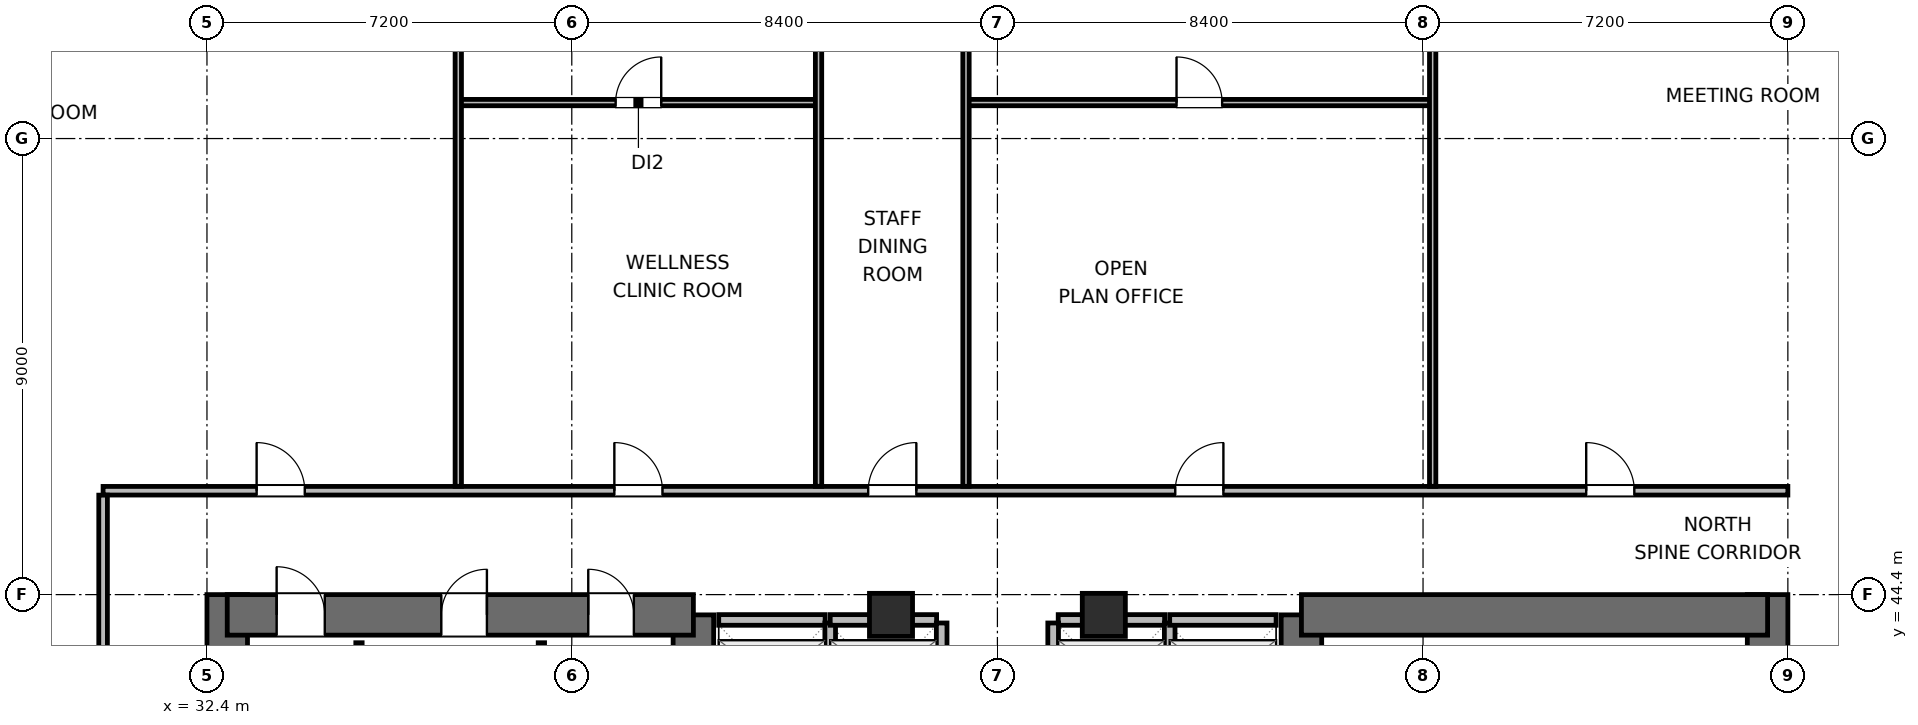
"""IFC4 building model, lengths in metres.
Left out: names, types, materials, properties, quantities, classifications, styles, units other than length and angle.
Written with IfcOpenShell. Run it as: python <this file> out.ifc"""

import sys

from ifc_helpers import new_model, si_unit, direction, frame, frame_2d, origin, origin_2d, place, context, subcontext, project, spatial, rectangle, extrude, element, fill, save


model = new_model("IFC4")
c1 = context("Model", 3, precision=1e-05, world=origin(), true_north=direction((0.0, 1.0)))
c2 = subcontext(c1, "Body", "Model", "MODEL_VIEW")
j1 = project(units=[si_unit("LENGTHUNIT", "METRE"), si_unit("PLANEANGLEUNIT", "RADIAN")], contexts=[c1])
p1 = place(None, origin())
s1 = spatial("IfcSite", under=j1, at=p1, CompositionType="ELEMENT")
p2 = place(p1, origin())
s2 = spatial("IfcBuilding", under=s1, at=p2, CompositionType="ELEMENT")
p3 = place(p2, frame((0.0, 0.0, 141.6)))
s3 = spatial("IfcBuildingStorey", under=s2, at=p3, CompositionType="ELEMENT", Elevation=141.6)
p4 = place(p3, frame((32.8, 27.6, 0.0), z_axis=(0.0, 0.0, 1.0), x_axis=(0.0, 1.0, 0.0)))
e1 = element("IfcWall", 1, at=p4, inside=s3, PredefinedType="SHEAR", context=c2, shape_type="SweptSolid", body=[
    extrude(rectangle(XDim=16.8, YDim=0.8, at=frame_2d((8.4, 0.0))), origin(), (0.0, 0.0, 1.0), 3.9),
])
p5 = place(p3, frame((42.0, 37.8, 0.0), z_axis=(0.0, 0.0, 1.0), x_axis=(0.0, 1.0, 0.0)))
e2 = element("IfcWall", 2, at=p5, inside=s3, PredefinedType="SHEAR", context=c2, shape_type="SweptSolid", body=[
    extrude(rectangle(XDim=6.2, YDim=0.8, at=frame_2d((3.1, 0.0))), origin(), (0.0, 0.0, 1.0), 3.9),
])
p6 = place(p3, frame((32.8, 44.0, 0.0), z_axis=(0.0, 0.0, 1.0), x_axis=(1.0, 0.0, 0.0)))
e3 = element("IfcWall", 3, at=p6, inside=s3, PredefinedType="SHEAR", context=c2, shape_type="SweptSolid", body=[
    extrude(rectangle(XDim=9.2, YDim=0.8, at=frame_2d((4.6, 0.0))), origin(), (0.0, 0.0, 1.0), 3.9),
])
p7 = place(p6, frame((0.975, 0.0, 0.0)))
e4 = element("IfcOpeningElement", 4, at=p7, cuts=e3, PredefinedType="OPENING", context=c2, shape_type="SweptSolid", body=[
    extrude(rectangle(XDim=0.95, YDim=2.04, at=frame_2d((0.475, 1.02))), frame((0.0, 0.41, 0.0), z_axis=(0.0, -1.0, 0.0), x_axis=(1.0, 0.0, 0.0)), (0.0, 0.0, 1.0), 0.82),
])
p8 = place(p6, frame((4.225, 0.0, 0.0)))
e5 = element("IfcOpeningElement", 5, at=p8, cuts=e3, PredefinedType="OPENING", context=c2, shape_type="SweptSolid", body=[
    extrude(rectangle(XDim=0.9, YDim=2.02, at=frame_2d((0.45, 1.01))), frame((0.0, 0.41, 0.0), z_axis=(0.0, -1.0, 0.0), x_axis=(1.0, 0.0, 0.0)), (0.0, 0.0, 1.0), 0.82),
])
p9 = place(p6, frame((7.125, 0.0, 0.0)))
e6 = element("IfcOpeningElement", 6, at=p9, cuts=e3, PredefinedType="OPENING", context=c2, shape_type="SweptSolid", body=[
    extrude(rectangle(XDim=0.9, YDim=2.02, at=frame_2d((0.45, 1.01))), frame((0.0, 0.41, 0.0), z_axis=(0.0, -1.0, 0.0), x_axis=(1.0, 0.0, 0.0)), (0.0, 0.0, 1.0), 0.82),
])
p10 = place(p3, frame((54.0, 38.0, 0.0), z_axis=(0.0, 0.0, 1.0), x_axis=(0.0, 1.0, 0.0)))
e7 = element("IfcWall", 7, at=p10, inside=s3, PredefinedType="SHEAR", context=c2, shape_type="SweptSolid", body=[
    extrude(rectangle(XDim=6.0, YDim=0.8, at=frame_2d((3.0, 0.0))), origin(), (0.0, 0.0, 1.0), 3.9),
])
p11 = place(p3, frame((63.2, 27.6, 0.0), z_axis=(0.0, 0.0, 1.0), x_axis=(0.0, 1.0, 0.0)))
e8 = element("IfcWall", 8, at=p11, inside=s3, PredefinedType="SHEAR", context=c2, shape_type="SweptSolid", body=[
    extrude(rectangle(XDim=16.8, YDim=0.8, at=frame_2d((8.4, 0.0))), origin(), (0.0, 0.0, 1.0), 3.9),
])
p12 = place(p3, frame((54.0, 44.0, 0.0), z_axis=(0.0, 0.0, 1.0), x_axis=(1.0, 0.0, 0.0)))
e9 = element("IfcWall", 9, at=p12, inside=s3, PredefinedType="SHEAR", context=c2, shape_type="SweptSolid", body=[
    extrude(rectangle(XDim=9.2, YDim=0.8, at=frame_2d((4.6, 0.0))), origin(), (0.0, 0.0, 1.0), 3.9),
])
for number, where, z_axis, x_axis in (
    (10, (45.9, 44.0, 0.0), (0.0, 0.0, 1.0), (1.0, 0.0, 0.0)),
    (11, (50.1, 44.0, 0.0), (0.0, 0.0, 1.0), (1.0, 0.0, 0.0)),
):
    element("IfcColumn", number, at=place(p3, frame(where, z_axis=z_axis, x_axis=x_axis)), inside=s3, PredefinedType="COLUMN", context=c2, shape_type="SweptSolid", body=[
        extrude(rectangle(XDim=0.85, YDim=0.85, at=origin_2d()), origin(), (0.0, 0.0, 1.0), 3.9),
    ])
for number, where, z_axis, x_axis in (
    (12, (35.4, 41.095, 0.0), (0.0, 0.0, 1.0), (0.0, 1.0, 0.0)),
    (13, (39.0, 41.095, 0.0), (0.0, 0.0, 1.0), (0.0, 1.0, 0.0)),
):
    element("IfcWall", number, at=place(p3, frame(where, z_axis=z_axis, x_axis=x_axis)), inside=s3, PredefinedType="PARTITIONING", context=c2, shape_type="SweptSolid", body=[
        extrude(rectangle(XDim=2.355, YDim=0.125, at=frame_2d((1.177, 0.0))), origin(), (0.0, 0.0, 1.0), 3.6),
    ])
p13 = place(p3, frame((42.5, 43.9, 0.0), z_axis=(0.0, 0.0, 1.0), x_axis=(1.0, 0.0, 0.0)))
e14 = element("IfcWall", 14, at=p13, inside=s3, PredefinedType="PARTITIONING", context=c2, shape_type="SweptSolid", body=[
    extrude(rectangle(XDim=2.1, YDim=0.21, at=frame_2d((1.05, 0.0))), origin(), (0.0, 0.0, 1.0), 2.485),
])
p14 = place(p3, frame((44.7, 41.56, 0.0), z_axis=(0.0, 0.0, 1.0), x_axis=(0.0, 1.0, 0.0)))
e15 = element("IfcWall", 15, at=p14, inside=s3, PredefinedType="PARTITIONING", context=c2, shape_type="SweptSolid", body=[
    extrude(rectangle(XDim=2.28, YDim=0.21, at=frame_2d((1.14, 0.0))), origin(), (0.0, 0.0, 1.0), 3.6),
])
p15 = place(p3, frame((44.7, 43.9, 0.0), z_axis=(0.0, 0.0, 1.0), x_axis=(1.0, 0.0, 0.0)))
e16 = element("IfcWall", 16, at=p15, inside=s3, PredefinedType="PARTITIONING", context=c2, shape_type="SweptSolid", body=[
    extrude(rectangle(XDim=2.1, YDim=0.21, at=frame_2d((1.05, 0.0))), origin(), (0.0, 0.0, 1.0), 2.485),
])
p16 = place(p3, frame((46.9, 41.56, 0.0), z_axis=(0.0, 0.0, 1.0), x_axis=(0.0, 1.0, 0.0)))
e17 = element("IfcWall", 17, at=p16, inside=s3, PredefinedType="PARTITIONING", context=c2, shape_type="SweptSolid", body=[
    extrude(rectangle(XDim=2.28, YDim=0.21, at=frame_2d((1.14, 0.0))), origin(), (0.0, 0.0, 1.0), 3.6),
])
p17 = place(p3, frame((49.2, 43.9, 0.0), z_axis=(0.0, 0.0, 1.0), x_axis=(1.0, 0.0, 0.0)))
e18 = element("IfcWall", 18, at=p17, inside=s3, PredefinedType="PARTITIONING", context=c2, shape_type="SweptSolid", body=[
    extrude(rectangle(XDim=2.1, YDim=0.21, at=frame_2d((1.05, 0.0))), origin(), (0.0, 0.0, 1.0), 2.485),
])
for number, where, z_axis, x_axis in (
    (19, (49.1, 41.56, 0.0), (0.0, 0.0, 1.0), (0.0, 1.0, 0.0)),
    (20, (51.4, 41.56, 0.0), (0.0, 0.0, 1.0), (0.0, 1.0, 0.0)),
):
    element("IfcWall", number, at=place(p3, frame(where, z_axis=z_axis, x_axis=x_axis)), inside=s3, PredefinedType="PARTITIONING", context=c2, shape_type="SweptSolid", body=[
        extrude(rectangle(XDim=2.28, YDim=0.21, at=frame_2d((1.14, 0.0))), origin(), (0.0, 0.0, 1.0), 3.6),
    ])
p18 = place(p3, frame((51.4, 43.9, 0.0), z_axis=(0.0, 0.0, 1.0), x_axis=(1.0, 0.0, 0.0)))
e21 = element("IfcWall", 21, at=p18, inside=s3, PredefinedType="PARTITIONING", context=c2, shape_type="SweptSolid", body=[
    extrude(rectangle(XDim=2.1, YDim=0.21, at=frame_2d((1.05, 0.0))), origin(), (0.0, 0.0, 1.0), 2.485),
])
p19 = place(p3, frame((30.35, 46.45, 0.0), z_axis=(0.0, 0.0, 1.0), x_axis=(1.0, 0.0, 0.0)))
e22 = element("IfcWall", 22, at=p19, inside=s3, PredefinedType="PARTITIONING", context=c2, shape_type="SweptSolid", body=[
    extrude(rectangle(XDim=33.25, YDim=0.17, at=frame_2d((16.625, 0.0))), origin(), (0.0, 0.0, 1.0), 3.6),
])
p20 = place(p19, frame((3.03, 0.0, 0.0)))
e23 = element("IfcOpeningElement", 23, at=p20, cuts=e22, PredefinedType="OPENING", context=c2, shape_type="SweptSolid", body=[
    extrude(rectangle(XDim=0.95, YDim=2.04, at=frame_2d((0.475, 1.02))), frame((0.0, 0.095, 0.0), z_axis=(0.0, -1.0, 0.0), x_axis=(1.0, 0.0, 0.0)), (0.0, 0.0, 1.0), 0.19),
])
p21 = place(p19, frame((10.09, 0.0, 0.0)))
e24 = element("IfcOpeningElement", 24, at=p21, cuts=e22, PredefinedType="OPENING", context=c2, shape_type="SweptSolid", body=[
    extrude(rectangle(XDim=0.95, YDim=2.04, at=frame_2d((0.475, 1.02))), frame((0.0, 0.095, 0.0), z_axis=(0.0, -1.0, 0.0), x_axis=(1.0, 0.0, 0.0)), (0.0, 0.0, 1.0), 0.19),
])
p22 = place(p19, frame((15.1, 0.0, 0.0)))
e25 = element("IfcOpeningElement", 25, at=p22, cuts=e22, PredefinedType="OPENING", context=c2, shape_type="SweptSolid", body=[
    extrude(rectangle(XDim=0.95, YDim=2.04, at=frame_2d((0.475, 1.02))), frame((0.0, 0.095, 0.0), z_axis=(0.0, -1.0, 0.0), x_axis=(1.0, 0.0, 0.0)), (0.0, 0.0, 1.0), 0.19),
])
p23 = place(p19, frame((21.16, 0.0, 0.0)))
e26 = element("IfcOpeningElement", 26, at=p23, cuts=e22, PredefinedType="OPENING", context=c2, shape_type="SweptSolid", body=[
    extrude(rectangle(XDim=0.95, YDim=2.04, at=frame_2d((0.475, 1.02))), frame((0.0, 0.095, 0.0), z_axis=(0.0, -1.0, 0.0), x_axis=(1.0, 0.0, 0.0)), (0.0, 0.0, 1.0), 0.19),
])
p24 = place(p19, frame((29.27, 0.0, 0.0)))
e27 = element("IfcOpeningElement", 27, at=p24, cuts=e22, PredefinedType="OPENING", context=c2, shape_type="SweptSolid", body=[
    extrude(rectangle(XDim=0.95, YDim=2.04, at=frame_2d((0.475, 1.02))), frame((0.0, 0.095, 0.0), z_axis=(0.0, -1.0, 0.0), x_axis=(1.0, 0.0, 0.0)), (0.0, 0.0, 1.0), 0.19),
])
p25 = place(p3, frame((30.35, 37.1, 0.0), z_axis=(0.0, 0.0, 1.0), x_axis=(0.0, 1.0, 0.0)))
e28 = element("IfcWall", 28, at=p25, inside=s3, PredefinedType="PARTITIONING", context=c2, shape_type="SweptSolid", body=[
    extrude(rectangle(XDim=9.263, YDim=0.17, at=frame_2d((4.631, 0.0))), origin(), (0.0, 0.0, 1.0), 3.6),
])
p26 = place(p25, frame((4.2, 0.0, 0.0)))
e29 = element("IfcOpeningElement", 29, at=p26, cuts=e28, PredefinedType="OPENING", context=c2, shape_type="SweptSolid", body=[
    extrude(rectangle(XDim=0.95, YDim=2.04, at=frame_2d((0.475, 1.02))), frame((0.0, 0.095, 0.0), z_axis=(0.0, -1.0, 0.0), x_axis=(1.0, 0.0, 0.0)), (0.0, 0.0, 1.0), 0.19),
])
p27 = place(p3, frame((37.36, 54.11, 0.0), z_axis=(0.0, 0.0, 1.0), x_axis=(1.0, 0.0, 0.0)))
e30 = element("IfcWall", 30, at=p27, inside=s3, PredefinedType="PARTITIONING", context=c2, shape_type="SweptSolid", body=[
    extrude(rectangle(XDim=7.11, YDim=0.125, at=frame_2d((3.555, 0.0))), origin(), (0.0, 0.0, 1.0), 3.6),
])
p28 = place(p27, frame((3.105, 0.0, 0.0)))
e31 = element("IfcOpeningElement", 31, at=p28, cuts=e30, PredefinedType="OPENING", context=c2, shape_type="SweptSolid", body=[
    extrude(rectangle(XDim=0.9, YDim=2.02, at=frame_2d((0.45, 1.01))), frame((0.0, 0.073, 0.0), z_axis=(0.0, -1.0, 0.0), x_axis=(1.0, 0.0, 0.0)), (0.0, 0.0, 1.0), 0.145),
])
p29 = place(p3, frame((37.36, 46.537, 0.0), z_axis=(0.0, 0.0, 1.0), x_axis=(0.0, 1.0, 0.0)))
e32 = element("IfcWall", 32, at=p29, inside=s3, PredefinedType="PARTITIONING", context=c2, shape_type="SweptSolid", body=[
    extrude(rectangle(XDim=15.618, YDim=0.125, at=frame_2d((7.809, 0.0))), origin(), (0.0, 0.0, 1.0), 3.6),
])
p30 = place(p3, frame((44.47, 46.537, 0.0), z_axis=(0.0, 0.0, 1.0), x_axis=(0.0, 1.0, 0.0)))
e33 = element("IfcWall", 33, at=p30, inside=s3, PredefinedType="PARTITIONING", context=c2, shape_type="SweptSolid", body=[
    extrude(rectangle(XDim=13.948, YDim=0.125, at=frame_2d((6.974, 0.0))), origin(), (0.0, 0.0, 1.0), 2.963),
])
p31 = place(p3, frame((47.38, 54.11, 0.0), z_axis=(0.0, 0.0, 1.0), x_axis=(1.0, 0.0, 0.0)))
e34 = element("IfcWall", 34, at=p31, inside=s3, PredefinedType="PARTITIONING", context=c2, shape_type="SweptSolid", body=[
    extrude(rectangle(XDim=9.21, YDim=0.125, at=frame_2d((4.605, 0.0))), origin(), (0.0, 0.0, 1.0), 3.6),
])
p32 = place(p31, frame((4.155, 0.0, 0.0)))
e35 = element("IfcOpeningElement", 35, at=p32, cuts=e34, PredefinedType="OPENING", context=c2, shape_type="SweptSolid", body=[
    extrude(rectangle(XDim=0.9, YDim=2.02, at=frame_2d((0.45, 1.01))), frame((0.0, 0.073, 0.0), z_axis=(0.0, -1.0, 0.0), x_axis=(1.0, 0.0, 0.0)), (0.0, 0.0, 1.0), 0.145),
])
p33 = place(p3, frame((47.38, 46.537, 0.0), z_axis=(0.0, 0.0, 1.0), x_axis=(0.0, 1.0, 0.0)))
e36 = element("IfcWall", 36, at=p33, inside=s3, PredefinedType="PARTITIONING", context=c2, shape_type="SweptSolid", body=[
    extrude(rectangle(XDim=13.948, YDim=0.125, at=frame_2d((6.974, 0.0))), origin(), (0.0, 0.0, 1.0), 3.6),
])
p34 = place(p3, frame((56.59, 46.537, 0.0), z_axis=(0.0, 0.0, 1.0), x_axis=(0.0, 1.0, 0.0)))
e37 = element("IfcWall", 37, at=p34, inside=s3, PredefinedType="PARTITIONING", context=c2, shape_type="SweptSolid", body=[
    extrude(rectangle(XDim=15.548, YDim=0.125, at=frame_2d((7.774, 0.0))), origin(), (0.0, 0.0, 1.0), 2.135),
])
p35 = place(p7, origin())
e38 = element("IfcDoor", 38, at=p35, inside=s3, OperationType="SINGLE_SWING_LEFT", PredefinedType="DOOR", context=c2, shape_type="SweptSolid", body=[
    extrude(rectangle(XDim=0.95, YDim=2.04, at=frame_2d((0.475, 1.02))), frame((0.0, 0.025, 0.0), z_axis=(0.0, -1.0, 0.0), x_axis=(1.0, 0.0, 0.0)), (0.0, 0.0, 1.0), 0.05),
])
fill(e4, e38)
p36 = place(p8, origin())
e39 = element("IfcDoor", 39, at=p36, inside=s3, OperationType="SINGLE_SWING_RIGHT", PredefinedType="DOOR", context=c2, shape_type="SweptSolid", body=[
    extrude(rectangle(XDim=0.9, YDim=2.02, at=frame_2d((0.45, 1.01))), frame((0.0, 0.025, 0.0), z_axis=(0.0, -1.0, 0.0), x_axis=(1.0, 0.0, 0.0)), (0.0, 0.0, 1.0), 0.05),
])
fill(e5, e39)
p37 = place(p9, origin())
e40 = element("IfcDoor", 40, at=p37, inside=s3, OperationType="SINGLE_SWING_LEFT", PredefinedType="DOOR", context=c2, shape_type="SweptSolid", body=[
    extrude(rectangle(XDim=0.9, YDim=2.02, at=frame_2d((0.45, 1.01))), frame((0.0, 0.025, 0.0), z_axis=(0.0, -1.0, 0.0), x_axis=(1.0, 0.0, 0.0)), (0.0, 0.0, 1.0), 0.05),
])
fill(e6, e40)
p38 = place(p20, origin())
e41 = element("IfcDoor", 41, at=p38, inside=s3, OperationType="SINGLE_SWING_LEFT", PredefinedType="DOOR", context=c2, shape_type="SweptSolid", body=[
    extrude(rectangle(XDim=0.95, YDim=2.04, at=frame_2d((0.475, 1.02))), frame((0.0, 0.025, 0.0), z_axis=(0.0, -1.0, 0.0), x_axis=(1.0, 0.0, 0.0)), (0.0, 0.0, 1.0), 0.05),
])
fill(e23, e41)
p39 = place(p28, origin())
e42 = element("IfcDoor", 42, at=p39, inside=s3, OperationType="SINGLE_SWING_RIGHT", PredefinedType="DOOR", context=c2, shape_type="SweptSolid", body=[
    extrude(rectangle(XDim=0.9, YDim=2.02, at=frame_2d((0.45, 1.01))), frame((0.0, 0.025, 0.0), z_axis=(0.0, -1.0, 0.0), x_axis=(1.0, 0.0, 0.0)), (0.0, 0.0, 1.0), 0.05),
])
fill(e31, e42)
p40 = place(p21, origin())
e43 = element("IfcDoor", 43, at=p40, inside=s3, OperationType="SINGLE_SWING_LEFT", PredefinedType="DOOR", context=c2, shape_type="SweptSolid", body=[
    extrude(rectangle(XDim=0.95, YDim=2.04, at=frame_2d((0.475, 1.02))), frame((0.0, 0.025, 0.0), z_axis=(0.0, -1.0, 0.0), x_axis=(1.0, 0.0, 0.0)), (0.0, 0.0, 1.0), 0.05),
])
fill(e24, e43)
p41 = place(p22, origin())
e44 = element("IfcDoor", 44, at=p41, inside=s3, OperationType="SINGLE_SWING_RIGHT", PredefinedType="DOOR", context=c2, shape_type="SweptSolid", body=[
    extrude(rectangle(XDim=0.95, YDim=2.04, at=frame_2d((0.475, 1.02))), frame((0.0, 0.025, 0.0), z_axis=(0.0, -1.0, 0.0), x_axis=(1.0, 0.0, 0.0)), (0.0, 0.0, 1.0), 0.05),
])
fill(e25, e44)
p42 = place(p32, origin())
e45 = element("IfcDoor", 45, at=p42, inside=s3, OperationType="SINGLE_SWING_LEFT", PredefinedType="DOOR", context=c2, shape_type="SweptSolid", body=[
    extrude(rectangle(XDim=0.9, YDim=2.02, at=frame_2d((0.45, 1.01))), frame((0.0, 0.025, 0.0), z_axis=(0.0, -1.0, 0.0), x_axis=(1.0, 0.0, 0.0)), (0.0, 0.0, 1.0), 0.05),
])
fill(e35, e45)
p43 = place(p23, origin())
e46 = element("IfcDoor", 46, at=p43, inside=s3, OperationType="SINGLE_SWING_RIGHT", PredefinedType="DOOR", context=c2, shape_type="SweptSolid", body=[
    extrude(rectangle(XDim=0.95, YDim=2.04, at=frame_2d((0.475, 1.02))), frame((0.0, 0.025, 0.0), z_axis=(0.0, -1.0, 0.0), x_axis=(1.0, 0.0, 0.0)), (0.0, 0.0, 1.0), 0.05),
])
fill(e26, e46)
p44 = place(p24, origin())
e47 = element("IfcDoor", 47, at=p44, inside=s3, OperationType="SINGLE_SWING_LEFT", PredefinedType="DOOR", context=c2, shape_type="SweptSolid", body=[
    extrude(rectangle(XDim=0.95, YDim=2.04, at=frame_2d((0.475, 1.02))), frame((0.0, 0.025, 0.0), z_axis=(0.0, -1.0, 0.0), x_axis=(1.0, 0.0, 0.0)), (0.0, 0.0, 1.0), 0.05),
])
fill(e27, e47)
save(model, sys.argv[1])
